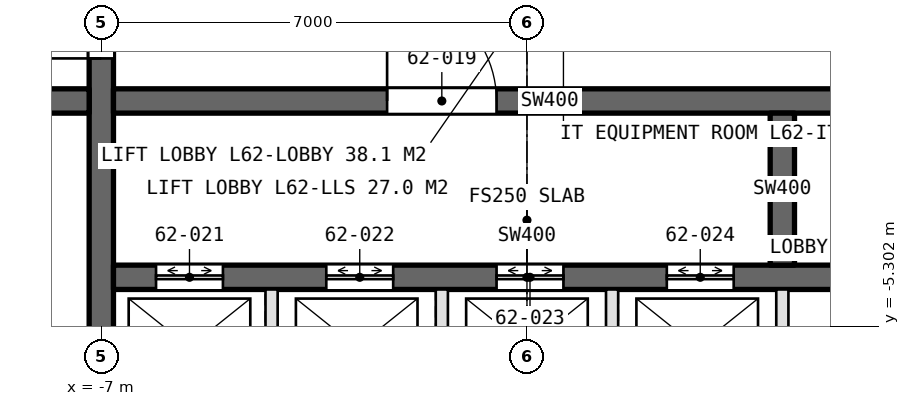
"""IFC4 building model, lengths in metres.
Left out: names, types, materials, properties, quantities, classifications, styles, units other than length and angle.
Written with IfcOpenShell. Run it as: python <this file> out.ifc"""

import sys

from ifc_helpers import new_model, si_unit, direction, frame, frame_2d, origin, place, context, subcontext, project, spatial, rectangle, extrude, element, fill, save


model = new_model("IFC4")
c1 = context("Model", 3, precision=1e-05, world=origin(), true_north=direction((0.0, 1.0)))
c2 = subcontext(c1, "Body", "Model", "MODEL_VIEW")
j1 = project(units=[si_unit("LENGTHUNIT", "METRE"), si_unit("PLANEANGLEUNIT", "RADIAN")], contexts=[c1])
p1 = place(None, origin())
s1 = spatial("IfcSite", under=j1, at=p1, CompositionType="ELEMENT")
p2 = place(p1, origin())
s2 = spatial("IfcBuilding", under=s1, at=p2, CompositionType="ELEMENT")
p3 = place(p2, frame((0.0, 0.0, 279.6)))
s3 = spatial("IfcBuildingStorey", under=s2, at=p3, CompositionType="ELEMENT", Elevation=279.6)
p4 = place(p3, frame((-7.0, -8.9, 0.0), z_axis=(0.0, 0.0, 1.0), x_axis=(0.0, 1.0, 0.0)))
e1 = element("IfcWall", 1, at=p4, inside=s3, PredefinedType="SHEAR", context=c2, shape_type="SweptSolid", body=[
    extrude(rectangle(XDim=17.8, YDim=0.4, at=frame_2d((8.9, 0.0))), origin(), (0.0, 0.0, 1.0), 4.2),
])
p5 = place(p4, frame((8.0, 0.0, 0.0)))
e2 = element("IfcOpeningElement", 2, at=p5, cuts=e1, PredefinedType="OPENING", context=c2, shape_type="SweptSolid", body=[
    extrude(rectangle(XDim=1.8, YDim=2.4, at=frame_2d((0.9, 1.2))), frame((0.0, 0.21, 0.0), z_axis=(0.0, -1.0, 0.0), x_axis=(1.0, 0.0, 0.0)), (0.0, 0.0, 1.0), 0.42),
])
p6 = place(p3, frame((-6.8, -1.6, 0.0), z_axis=(0.0, 0.0, 1.0), x_axis=(1.0, 0.0, 0.0)))
e3 = element("IfcWall", 3, at=p6, inside=s3, PredefinedType="SHEAR", context=c2, shape_type="SweptSolid", body=[
    extrude(rectangle(XDim=13.6, YDim=0.4, at=frame_2d((6.8, 0.0))), origin(), (0.0, 0.0, 1.0), 4.2),
])
p7 = place(p6, frame((11.95, 0.0, 0.0)))
e4 = element("IfcOpeningElement", 4, at=p7, cuts=e3, PredefinedType="OPENING", context=c2, shape_type="SweptSolid", body=[
    extrude(rectangle(XDim=0.9, YDim=2.4, at=frame_2d((0.45, 1.2))), frame((0.0, 0.21, 0.0), z_axis=(0.0, -1.0, 0.0), x_axis=(1.0, 0.0, 0.0)), (0.0, 0.0, 1.0), 0.42),
])
p8 = place(p6, frame((4.5, 0.0, 0.0)))
e5 = element("IfcOpeningElement", 5, at=p8, cuts=e3, PredefinedType="OPENING", context=c2, shape_type="SweptSolid", body=[
    extrude(rectangle(XDim=1.8, YDim=2.4, at=frame_2d((0.9, 1.2))), frame((0.0, 0.21, 0.0), z_axis=(0.0, -1.0, 0.0), x_axis=(1.0, 0.0, 0.0)), (0.0, 0.0, 1.0), 0.42),
])
p9 = place(p3, frame((-6.8, -4.5, 0.0), z_axis=(0.0, 0.0, 1.0), x_axis=(1.0, 0.0, 0.0)))
e6 = element("IfcWall", 6, at=p9, inside=s3, PredefinedType="SHEAR", context=c2, shape_type="SweptSolid", body=[
    extrude(rectangle(XDim=13.6, YDim=0.4, at=frame_2d((6.8, 0.0))), origin(), (0.0, 0.0, 1.0), 4.2),
])
p10 = place(p9, frame((0.7, 0.0, 0.0)))
e7 = element("IfcOpeningElement", 7, at=p10, cuts=e6, PredefinedType="OPENING", context=c2, shape_type="SweptSolid", body=[
    extrude(rectangle(XDim=1.1, YDim=2.4, at=frame_2d((0.55, 1.2))), frame((0.0, 0.21, 0.0), z_axis=(0.0, -1.0, 0.0), x_axis=(1.0, 0.0, 0.0)), (0.0, 0.0, 1.0), 0.42),
])
p11 = place(p9, frame((3.5, 0.0, 0.0)))
e8 = element("IfcOpeningElement", 8, at=p11, cuts=e6, PredefinedType="OPENING", context=c2, shape_type="SweptSolid", body=[
    extrude(rectangle(XDim=1.1, YDim=2.4, at=frame_2d((0.55, 1.2))), frame((0.0, 0.21, 0.0), z_axis=(0.0, -1.0, 0.0), x_axis=(1.0, 0.0, 0.0)), (0.0, 0.0, 1.0), 0.42),
])
p12 = place(p9, frame((6.3, 0.0, 0.0)))
e9 = element("IfcOpeningElement", 9, at=p12, cuts=e6, PredefinedType="OPENING", context=c2, shape_type="SweptSolid", body=[
    extrude(rectangle(XDim=1.1, YDim=2.4, at=frame_2d((0.55, 1.2))), frame((0.0, 0.21, 0.0), z_axis=(0.0, -1.0, 0.0), x_axis=(1.0, 0.0, 0.0)), (0.0, 0.0, 1.0), 0.42),
])
p13 = place(p9, frame((9.1, 0.0, 0.0)))
e10 = element("IfcOpeningElement", 10, at=p13, cuts=e6, PredefinedType="OPENING", context=c2, shape_type="SweptSolid", body=[
    extrude(rectangle(XDim=1.1, YDim=2.4, at=frame_2d((0.55, 1.2))), frame((0.0, 0.21, 0.0), z_axis=(0.0, -1.0, 0.0), x_axis=(1.0, 0.0, 0.0)), (0.0, 0.0, 1.0), 0.42),
])
p14 = place(p3, frame((-12.9, -1.6, 0.0), z_axis=(0.0, 0.0, 1.0), x_axis=(1.0, 0.0, 0.0)))
e11 = element("IfcWall", 11, at=p14, inside=s3, PredefinedType="SHEAR", context=c2, shape_type="SweptSolid", body=[
    extrude(rectangle(XDim=5.7, YDim=0.4, at=frame_2d((2.85, 0.0))), origin(), (0.0, 0.0, 1.0), 4.2),
])
p15 = place(p3, frame((4.2, -4.3, 0.0), z_axis=(0.0, 0.0, 1.0), x_axis=(0.0, 1.0, 0.0)))
e12 = element("IfcWall", 12, at=p15, inside=s3, PredefinedType="SHEAR", context=c2, shape_type="SweptSolid", body=[
    extrude(rectangle(XDim=2.5, YDim=0.4, at=frame_2d((1.25, 0.0))), origin(), (0.0, 0.0, 1.0), 4.2),
])
for number, where, z_axis, x_axis in (
    (13, (-4.2, -4.7, 0.0), (0.0, 0.0, 1.0), (0.0, -1.0, 0.0)),
    (14, (-1.4, -4.7, 0.0), (0.0, 0.0, 1.0), (0.0, -1.0, 0.0)),
    (15, (1.4, -4.7, 0.0), (0.0, 0.0, 1.0), (0.0, -1.0, 0.0)),
    (16, (4.2, -4.7, 0.0), (0.0, 0.0, 1.0), (0.0, -1.0, 0.0)),
):
    element("IfcWall", number, at=place(p3, frame(where, z_axis=z_axis, x_axis=x_axis)), inside=s3, PredefinedType="PARTITIONING", context=c2, shape_type="SweptSolid", body=[
        extrude(rectangle(XDim=4.2, YDim=0.2, at=frame_2d((2.1, 0.0))), origin(), (0.0, 0.0, 1.0), 4.2),
    ])
p16 = place(p5, origin())
e17 = element("IfcDoor", 17, at=p16, inside=s3, OperationType="DOUBLE_DOOR_SINGLE_SWING", PredefinedType="DOOR", context=c2, shape_type="SweptSolid", body=[
    extrude(rectangle(XDim=1.8, YDim=2.4, at=frame_2d((0.9, 1.2))), frame((0.0, 0.025, 0.0), z_axis=(0.0, -1.0, 0.0), x_axis=(1.0, 0.0, 0.0)), (0.0, 0.0, 1.0), 0.05),
])
fill(e2, e17)
p17 = place(p8, origin())
e18 = element("IfcDoor", 18, at=p17, inside=s3, OperationType="DOUBLE_DOOR_SINGLE_SWING", PredefinedType="DOOR", context=c2, shape_type="SweptSolid", body=[
    extrude(rectangle(XDim=1.8, YDim=2.4, at=frame_2d((0.9, 1.2))), frame((0.0, 0.025, 0.0), z_axis=(0.0, -1.0, 0.0), x_axis=(1.0, 0.0, 0.0)), (0.0, 0.0, 1.0), 0.05),
])
fill(e5, e18)
p18 = place(p10, origin())
e19 = element("IfcDoor", 19, at=p18, inside=s3, OperationType="DOUBLE_DOOR_SLIDING", PredefinedType="DOOR", context=c2, shape_type="SweptSolid", body=[
    extrude(rectangle(XDim=1.1, YDim=2.4, at=frame_2d((0.55, 1.2))), frame((0.0, 0.025, 0.0), z_axis=(0.0, -1.0, 0.0), x_axis=(1.0, 0.0, 0.0)), (0.0, 0.0, 1.0), 0.05),
])
fill(e7, e19)
p19 = place(p11, origin())
e20 = element("IfcDoor", 20, at=p19, inside=s3, OperationType="DOUBLE_DOOR_SLIDING", PredefinedType="DOOR", context=c2, shape_type="SweptSolid", body=[
    extrude(rectangle(XDim=1.1, YDim=2.4, at=frame_2d((0.55, 1.2))), frame((0.0, 0.025, 0.0), z_axis=(0.0, -1.0, 0.0), x_axis=(1.0, 0.0, 0.0)), (0.0, 0.0, 1.0), 0.05),
])
fill(e8, e20)
p20 = place(p12, origin())
e21 = element("IfcDoor", 21, at=p20, inside=s3, OperationType="DOUBLE_DOOR_SLIDING", PredefinedType="DOOR", context=c2, shape_type="SweptSolid", body=[
    extrude(rectangle(XDim=1.1, YDim=2.4, at=frame_2d((0.55, 1.2))), frame((0.0, 0.025, 0.0), z_axis=(0.0, -1.0, 0.0), x_axis=(1.0, 0.0, 0.0)), (0.0, 0.0, 1.0), 0.05),
])
fill(e9, e21)
p21 = place(p13, origin())
e22 = element("IfcDoor", 22, at=p21, inside=s3, OperationType="DOUBLE_DOOR_SLIDING", PredefinedType="DOOR", context=c2, shape_type="SweptSolid", body=[
    extrude(rectangle(XDim=1.1, YDim=2.4, at=frame_2d((0.55, 1.2))), frame((0.0, 0.025, 0.0), z_axis=(0.0, -1.0, 0.0), x_axis=(1.0, 0.0, 0.0)), (0.0, 0.0, 1.0), 0.05),
])
fill(e10, e22)
save(model, sys.argv[1])
